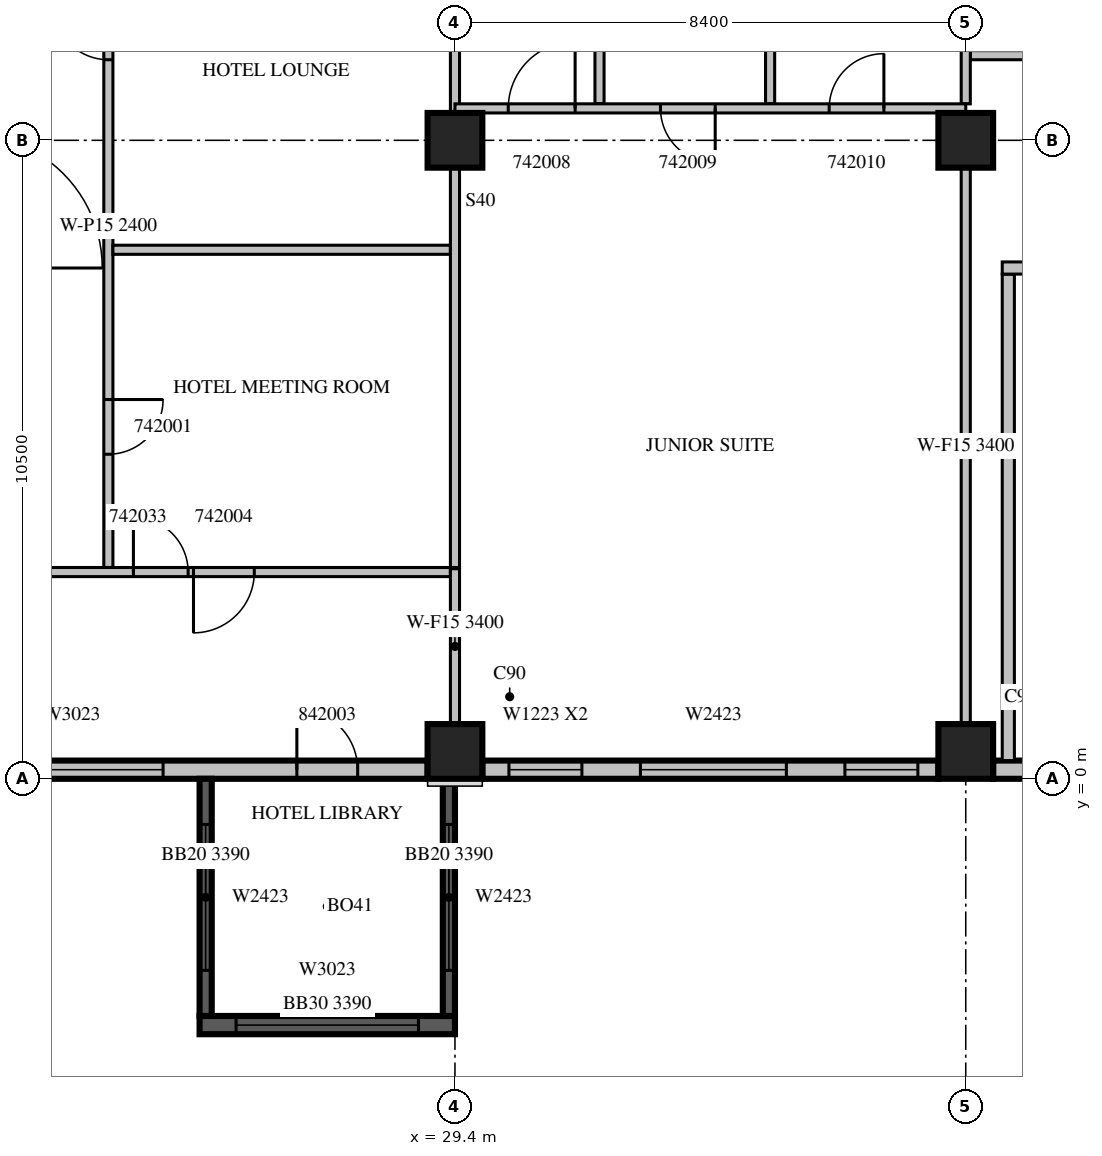
"""IFC4 building model, lengths in metres.
Left out: names, types, materials, properties, quantities, classifications, styles, units other than length and angle.
Written with IfcOpenShell. Run it as: python <this file> out.ifc"""

import sys

from ifc_helpers import new_model, si_unit, direction, frame, frame_2d, origin, origin_2d, place, context, subcontext, project, spatial, rectangle, extrude, source, transform, mapped, element, fill, save


model = new_model("IFC4")
c1 = context("Model", 3, precision=1e-05, world=origin(), true_north=direction((0.0, 1.0)))
c2 = subcontext(c1, "Body", "Model", "MODEL_VIEW")
j1 = project(units=[si_unit("LENGTHUNIT", "METRE"), si_unit("PLANEANGLEUNIT", "RADIAN")], contexts=[c1])
p1 = place(None, origin())
s1 = spatial("IfcSite", under=j1, at=p1, CompositionType="ELEMENT")
p2 = place(p1, origin())
s2 = spatial("IfcBuilding", under=s1, at=p2, CompositionType="ELEMENT")
p3 = place(p2, frame((0.0, 0.0, 193.0)))
s3 = spatial("IfcBuildingStorey", under=s2, at=p3, CompositionType="ELEMENT", Elevation=193.0)
m1 = source(origin(), c2, "Body", "SweptSolid", [
    extrude(rectangle(XDim=0.9, YDim=0.9, at=origin_2d()), origin(), (0.0, 0.0, 1.0), 3.8),
])
for number, where, z_axis, x_axis in (
    (1, (29.4, 0.45, 0.0), (0.0, 0.0, 1.0), (1.0, 0.0, 0.0)),
    (2, (37.8, 0.45, 0.0), (0.0, 0.0, 1.0), (1.0, 0.0, 0.0)),
    (3, (29.4, 10.5, 0.0), (0.0, 0.0, 1.0), (1.0, 0.0, 0.0)),
    (4, (37.8, 10.5, 0.0), (0.0, 0.0, 1.0), (1.0, 0.0, 0.0)),
):
    element("IfcColumn", number, at=place(p3, frame(where, z_axis=z_axis, x_axis=x_axis)), inside=s3, PredefinedType="COLUMN", context=c2, shape_type="MappedRepresentation", body=[
        mapped(m1, transform((0.0, 0.0, 0.0), scale=1.0)),
    ])
m2 = source(origin(), c2, "Body", "SweptSolid", [
    extrude(rectangle(XDim=7.5, YDim=0.3, at=frame_2d((3.75, 0.0))), origin(), (0.0, 0.0, 1.0), 3.4),
])
p4 = place(p3, frame((21.45, 0.15, 0.0), z_axis=(0.0, 0.0, 1.0), x_axis=(1.0, 0.0, 0.0)))
e5 = element("IfcWall", 5, at=p4, inside=s3, PredefinedType="STANDARD", context=c2, shape_type="MappedRepresentation", body=[
    mapped(m2, transform((0.0, 0.0, 0.0), scale=1.0)),
])
m3 = source(origin(), c2, "Body", "SweptSolid", [
    extrude(rectangle(XDim=3.0, YDim=2.3, at=frame_2d((1.5, 1.15))), frame((0.0, 0.16, 0.0), z_axis=(0.0, -1.0, 0.0), x_axis=(1.0, 0.0, 0.0)), (0.0, 0.0, 1.0), 0.32),
])
p5 = place(p4, frame((0.15, 0.0, 0.6)))
e6 = element("IfcOpeningElement", 6, at=p5, cuts=e5, PredefinedType="OPENING", context=c2, shape_type="MappedRepresentation", body=[
    mapped(m3, transform((0.0, 0.0, 0.0), scale=1.0)),
])
m4 = source(origin(), c2, "Body", "SweptSolid", [
    extrude(rectangle(XDim=1.0, YDim=2.1, at=frame_2d((0.5, 1.05))), frame((0.0, 0.16, 0.0), z_axis=(0.0, -1.0, 0.0), x_axis=(1.0, 0.0, 0.0)), (0.0, 0.0, 1.0), 0.32),
])
p6 = place(p4, frame((5.35, 0.0, 0.0)))
e7 = element("IfcOpeningElement", 7, at=p6, cuts=e5, PredefinedType="OPENING", context=c2, shape_type="MappedRepresentation", body=[
    mapped(m4, transform((0.0, 0.0, 0.0), scale=1.0)),
])
p7 = place(p3, frame((29.85, 0.15, 0.0), z_axis=(0.0, 0.0, 1.0), x_axis=(1.0, 0.0, 0.0)))
e8 = element("IfcWall", 8, at=p7, inside=s3, PredefinedType="STANDARD", context=c2, shape_type="MappedRepresentation", body=[
    mapped(m2, transform((0.0, 0.0, 0.0), scale=1.0)),
])
m5 = source(origin(), c2, "Body", "SweptSolid", [
    extrude(rectangle(XDim=1.2, YDim=2.3, at=frame_2d((0.6, 1.15))), frame((0.0, 0.16, 0.0), z_axis=(0.0, -1.0, 0.0), x_axis=(1.0, 0.0, 0.0)), (0.0, 0.0, 1.0), 0.32),
])
p8 = place(p7, frame((0.438, 0.0, 0.6)))
e9 = element("IfcOpeningElement", 9, at=p8, cuts=e8, PredefinedType="OPENING", context=c2, shape_type="MappedRepresentation", body=[
    mapped(m5, transform((0.0, 0.0, 0.0), scale=1.0)),
])
p9 = place(p7, frame((5.963, 0.0, 0.6)))
e10 = element("IfcOpeningElement", 10, at=p9, cuts=e8, PredefinedType="OPENING", context=c2, shape_type="MappedRepresentation", body=[
    mapped(m5, transform((0.0, 0.0, 0.0), scale=1.0)),
])
m6 = source(origin(), c2, "Body", "SweptSolid", [
    extrude(rectangle(XDim=2.4, YDim=2.3, at=frame_2d((1.2, 1.15))), frame((0.0, 0.16, 0.0), z_axis=(0.0, -1.0, 0.0), x_axis=(1.0, 0.0, 0.0)), (0.0, 0.0, 1.0), 0.32),
])
p10 = place(p7, frame((2.6, 0.0, 0.6)))
e11 = element("IfcOpeningElement", 11, at=p10, cuts=e8, PredefinedType="OPENING", context=c2, shape_type="MappedRepresentation", body=[
    mapped(m6, transform((0.0, 0.0, 0.0), scale=1.0)),
])
m7 = source(origin(), c2, "Body", "SweptSolid", [
    extrude(rectangle(XDim=1.95, YDim=0.3, at=frame_2d((0.975, 0.0))), origin(), (0.0, 0.0, 1.0), 3.4),
])
p11 = place(p3, frame((38.25, 0.15, 0.0), z_axis=(0.0, 0.0, 1.0), x_axis=(1.0, 0.0, 0.0)))
e12 = element("IfcWall", 12, at=p11, inside=s3, PredefinedType="STANDARD", context=c2, shape_type="MappedRepresentation", body=[
    mapped(m7, transform((0.0, 0.0, 0.0), scale=1.0)),
])
m8 = source(origin(), c2, "Body", "SweptSolid", [
    extrude(rectangle(XDim=4.2, YDim=0.3, at=frame_2d((2.1, 0.0))), origin(), (0.0, 0.0, 1.0), 3.39),
])
p12 = place(p3, frame((25.2, -4.05, 0.0), z_axis=(0.0, 0.0, 1.0), x_axis=(1.0, 0.0, 0.0)))
e13 = element("IfcWall", 13, at=p12, inside=s3, PredefinedType="SOLIDWALL", context=c2, shape_type="MappedRepresentation", body=[
    mapped(m8, transform((0.0, 0.0, 0.0), scale=1.0)),
])
p13 = place(p12, frame((0.6, 0.0, 0.6)))
e14 = element("IfcOpeningElement", 14, at=p13, cuts=e13, PredefinedType="OPENING", context=c2, shape_type="MappedRepresentation", body=[
    mapped(m3, transform((0.0, 0.0, 0.0), scale=1.0)),
])
m9 = source(origin(), c2, "Body", "SweptSolid", [
    extrude(rectangle(XDim=3.9, YDim=0.2, at=frame_2d((1.95, 0.0))), origin(), (0.0, 0.0, 1.0), 3.39),
])
p14 = place(p3, frame((25.3, 0.0, 0.0), z_axis=(0.0, 0.0, 1.0), x_axis=(0.0, -1.0, 0.0)))
e15 = element("IfcWall", 15, at=p14, inside=s3, PredefinedType="SOLIDWALL", context=c2, shape_type="MappedRepresentation", body=[
    mapped(m9, transform((0.0, 0.0, 0.0), scale=1.0)),
])
m10 = source(origin(), c2, "Body", "SweptSolid", [
    extrude(rectangle(XDim=2.4, YDim=2.3, at=frame_2d((1.2, 1.15))), frame((0.0, 0.11, 0.0), z_axis=(0.0, -1.0, 0.0), x_axis=(1.0, 0.0, 0.0)), (0.0, 0.0, 1.0), 0.22),
])
p15 = place(p14, frame((0.75, 0.0, 0.6)))
e16 = element("IfcOpeningElement", 16, at=p15, cuts=e15, PredefinedType="OPENING", context=c2, shape_type="MappedRepresentation", body=[
    mapped(m10, transform((0.0, 0.0, 0.0), scale=1.0)),
])
p16 = place(p3, frame((29.3, 0.0, 0.0), z_axis=(0.0, 0.0, 1.0), x_axis=(0.0, -1.0, 0.0)))
e17 = element("IfcWall", 17, at=p16, inside=s3, PredefinedType="SOLIDWALL", context=c2, shape_type="MappedRepresentation", body=[
    mapped(m9, transform((0.0, 0.0, 0.0), scale=1.0)),
])
p17 = place(p16, frame((0.75, 0.0, 0.6)))
e18 = element("IfcOpeningElement", 18, at=p17, cuts=e17, PredefinedType="OPENING", context=c2, shape_type="MappedRepresentation", body=[
    mapped(m10, transform((0.0, 0.0, 0.0), scale=1.0)),
])
m11 = source(origin(), c2, "Body", "SweptSolid", [
    extrude(rectangle(XDim=8.0, YDim=0.2, at=frame_2d((4.0, 0.0))), origin(), (0.0, 0.0, 1.0), 3.4),
])
p18 = place(p3, frame((38.5, 0.3, 0.0), z_axis=(0.0, 0.0, 1.0), x_axis=(0.0, 1.0, 0.0)))
e19 = element("IfcWall", 19, at=p18, inside=s3, PredefinedType="PARTITIONING", context=c2, shape_type="MappedRepresentation", body=[
    mapped(m11, transform((0.0, 0.0, 0.0), scale=1.0)),
])
m12 = source(origin(), c2, "Body", "SweptSolid", [
    extrude(rectangle(XDim=5.45, YDim=0.2, at=frame_2d((2.725, 0.0))), origin(), (0.0, 0.0, 1.0), 3.4),
])
p19 = place(p3, frame((38.4, 8.4, 0.0), z_axis=(0.0, 0.0, 1.0), x_axis=(1.0, 0.0, 0.0)))
e20 = element("IfcWall", 20, at=p19, inside=s3, PredefinedType="PARTITIONING", context=c2, shape_type="MappedRepresentation", body=[
    mapped(m12, transform((0.0, 0.0, 0.0), scale=1.0)),
])
m13 = source(origin(), c2, "Body", "SweptSolid", [
    extrude(rectangle(XDim=1.2, YDim=2.1, at=frame_2d((0.6, 1.05))), frame((0.0, 0.11, 0.0), z_axis=(0.0, -1.0, 0.0), x_axis=(1.0, 0.0, 0.0)), (0.0, 0.0, 1.0), 0.22),
])
p20 = place(p19, frame((0.4, 0.0, 0.0)))
e21 = element("IfcOpeningElement", 21, at=p20, cuts=e20, PredefinedType="OPENING", context=c2, shape_type="MappedRepresentation", body=[
    mapped(m13, transform((0.0, 0.0, 0.0), scale=1.0)),
])
m14 = source(origin(), c2, "Body", "SweptSolid", [
    extrude(rectangle(XDim=0.9, YDim=2.1, at=frame_2d((0.45, 1.05))), frame((0.0, 0.11, 0.0), z_axis=(0.0, -1.0, 0.0), x_axis=(1.0, 0.0, 0.0)), (0.0, 0.0, 1.0), 0.22),
])
p21 = place(p19, frame((3.25, 0.0, 0.0)))
e22 = element("IfcOpeningElement", 22, at=p21, cuts=e20, PredefinedType="OPENING", context=c2, shape_type="MappedRepresentation", body=[
    mapped(m14, transform((0.0, 0.0, 0.0), scale=1.0)),
])
p22 = place(p3, frame((23.7, 14.7, 0.0), z_axis=(0.0, 0.0, 1.0), x_axis=(0.0, -1.0, 0.0)))
e23 = element("IfcWall", 23, at=p22, inside=s3, PredefinedType="PARTITIONING", context=c2, shape_type="SweptSolid", body=[
    extrude(rectangle(XDim=11.225, YDim=0.15, at=frame_2d((5.612, 0.0))), origin(), (0.0, 0.0, 1.0), 2.4),
])
m15 = source(origin(), c2, "Body", "SweptSolid", [
    extrude(rectangle(XDim=0.9, YDim=2.1, at=frame_2d((0.45, 1.05))), frame((0.0, 0.085, 0.0), z_axis=(0.0, -1.0, 0.0), x_axis=(1.0, 0.0, 0.0)), (0.0, 0.0, 1.0), 0.17),
])
p23 = place(p22, frame((8.463, 0.0, 0.0)))
e24 = element("IfcOpeningElement", 24, at=p23, cuts=e23, PredefinedType="OPENING", context=c2, shape_type="MappedRepresentation", body=[
    mapped(m15, transform((0.0, 0.0, 0.0), scale=1.0)),
])
p24 = place(p22, frame((1.975, 0.0, 0.0)))
e25 = element("IfcOpeningElement", 25, at=p24, cuts=e23, PredefinedType="OPENING", context=c2, shape_type="MappedRepresentation", body=[
    mapped(m15, transform((0.0, 0.0, 0.0), scale=1.0)),
])
m16 = source(origin(), c2, "Body", "SweptSolid", [
    extrude(rectangle(XDim=5.55, YDim=0.15, at=frame_2d((2.775, 0.0))), origin(), (0.0, 0.0, 1.0), 3.4),
])
p25 = place(p3, frame((29.325, 8.7, 0.0), z_axis=(0.0, 0.0, 1.0), x_axis=(-1.0, 0.0, 0.0)))
e26 = element("IfcWall", 26, at=p25, inside=s3, PredefinedType="PARTITIONING", context=c2, shape_type="MappedRepresentation", body=[
    mapped(m16, transform((0.0, 0.0, 0.0), scale=1.0)),
])
m17 = source(origin(), c2, "Body", "SweptSolid", [
    extrude(rectangle(XDim=6.576, YDim=0.15, at=frame_2d((3.288, 0.0))), origin(), (0.0, 0.0, 1.0), 3.4),
])
p26 = place(p3, frame((29.4, 3.475, 0.0), z_axis=(0.0, 0.0, 1.0), x_axis=(0.0, 1.0, 0.0)))
e27 = element("IfcWall", 27, at=p26, inside=s3, PredefinedType="PARTITIONING", context=c2, shape_type="MappedRepresentation", body=[
    mapped(m17, transform((0.0, 0.0, 0.0), scale=1.0)),
])
p27 = place(p3, frame((29.4, 10.949, 0.0), z_axis=(0.0, 0.0, 1.0), x_axis=(0.0, 1.0, 0.0)))
e28 = element("IfcWall", 28, at=p27, inside=s3, PredefinedType="PARTITIONING", context=c2, shape_type="SweptSolid", body=[
    extrude(rectangle(XDim=3.751, YDim=0.15, at=frame_2d((1.875, 0.0))), origin(), (0.0, 0.0, 1.0), 3.4),
])
m18 = source(origin(), c2, "Body", "SweptSolid", [
    extrude(rectangle(XDim=7.525, YDim=0.15, at=frame_2d((3.763, 0.0))), origin(), (0.0, 0.0, 1.0), 3.4),
])
p28 = place(p3, frame((21.8, 3.4, 0.0), z_axis=(0.0, 0.0, 1.0), x_axis=(1.0, 0.0, 0.0)))
e29 = element("IfcWall", 29, at=p28, inside=s3, PredefinedType="PARTITIONING", context=c2, shape_type="MappedRepresentation", body=[
    mapped(m18, transform((0.0, 0.0, 0.0), scale=1.0)),
])
m19 = source(origin(), c2, "Body", "SweptSolid", [
    extrude(rectangle(XDim=1.0, YDim=2.1, at=frame_2d((0.5, 1.05))), frame((0.0, 0.085, 0.0), z_axis=(0.0, -1.0, 0.0), x_axis=(1.0, 0.0, 0.0)), (0.0, 0.0, 1.0), 0.17),
])
p29 = place(p28, frame((3.3, 0.0, 0.0)))
e30 = element("IfcOpeningElement", 30, at=p29, cuts=e29, PredefinedType="OPENING", context=c2, shape_type="MappedRepresentation", body=[
    mapped(m19, transform((0.0, 0.0, 0.0), scale=1.0)),
])
p30 = place(p28, frame((2.312, 0.0, 0.0)))
e31 = element("IfcOpeningElement", 31, at=p30, cuts=e29, PredefinedType="OPENING", context=c2, shape_type="MappedRepresentation", body=[
    mapped(m15, transform((0.0, 0.0, 0.0), scale=1.0)),
])
m20 = source(origin(), c2, "Body", "SweptSolid", [
    extrude(rectangle(XDim=6.45, YDim=0.15, at=frame_2d((3.225, 0.0))), origin(), (0.0, 0.0, 1.0), 3.4),
])
p31 = place(p3, frame((37.875, 11.9, 0.0), z_axis=(0.0, 0.0, 1.0), x_axis=(1.0, 0.0, 0.0)))
e32 = element("IfcWall", 32, at=p31, inside=s3, PredefinedType="PARTITIONING", context=c2, shape_type="MappedRepresentation", body=[
    mapped(m20, transform((0.0, 0.0, 0.0), scale=1.0)),
])
m21 = source(origin(), c2, "Body", "SweptSolid", [
    extrude(rectangle(XDim=3.6, YDim=0.15, at=frame_2d((1.8, 0.0))), origin(), (0.0, 0.0, 1.0), 3.4),
])
for number, where, z_axis, x_axis in (
    (33, (31.777, 11.1, 0.0), (0.0, 0.0, 1.0), (0.0, 1.0, 0.0)),
    (34, (34.583, 11.1, 0.0), (0.0, 0.0, 1.0), (0.0, 1.0, 0.0)),
):
    element("IfcWall", number, at=place(p3, frame(where, z_axis=z_axis, x_axis=x_axis)), inside=s3, PredefinedType="PARTITIONING", context=c2, shape_type="MappedRepresentation", body=[
        mapped(m21, transform((0.0, 0.0, 0.0), scale=1.0)),
    ])
m22 = source(origin(), c2, "Body", "SweptSolid", [
    extrude(rectangle(XDim=2.556, YDim=0.15, at=frame_2d((1.278, 0.0))), origin(), (0.0, 0.0, 1.0), 3.4),
])
p32 = place(p3, frame((29.4, 0.899, 0.0), z_axis=(0.0, 0.0, 1.0), x_axis=(0.0, 1.0, 0.0)))
e35 = element("IfcWall", 35, at=p32, inside=s3, PredefinedType="PARTITIONING", context=c2, shape_type="MappedRepresentation", body=[
    mapped(m22, transform((0.0, 0.0, 0.0), scale=1.0)),
])
m23 = source(origin(), c2, "Body", "SweptSolid", [
    extrude(rectangle(XDim=9.152, YDim=0.15, at=frame_2d((4.576, 0.0))), origin(), (0.0, 0.0, 1.0), 3.4),
])
p33 = place(p3, frame((37.8, 0.899, 0.0), z_axis=(0.0, 0.0, 1.0), x_axis=(0.0, 1.0, 0.0)))
e36 = element("IfcWall", 36, at=p33, inside=s3, PredefinedType="PARTITIONING", context=c2, shape_type="MappedRepresentation", body=[
    mapped(m23, transform((0.0, 0.0, 0.0), scale=1.0)),
])
p34 = place(p3, frame((37.8, 11.1, 0.0), z_axis=(0.0, 0.0, 1.0), x_axis=(0.0, 1.0, 0.0)))
e37 = element("IfcWall", 37, at=p34, inside=s3, PredefinedType="PARTITIONING", context=c2, shape_type="MappedRepresentation", body=[
    mapped(m21, transform((0.0, 0.0, 0.0), scale=1.0)),
])
m24 = source(origin(), c2, "Body", "SweptSolid", [
    extrude(rectangle(XDim=8.4, YDim=0.15, at=frame_2d((4.2, 0.0))), origin(), (0.0, 0.0, 1.0), 3.4),
])
p35 = place(p3, frame((37.8, 11.025, 0.0), z_axis=(0.0, 0.0, 1.0), x_axis=(-1.0, 0.0, 0.0)))
e38 = element("IfcWall", 38, at=p35, inside=s3, PredefinedType="PARTITIONING", context=c2, shape_type="MappedRepresentation", body=[
    mapped(m24, transform((0.0, 0.0, 0.0), scale=1.0)),
])
m25 = source(origin(), c2, "Body", "SweptSolid", [
    extrude(rectangle(XDim=1.1, YDim=2.1, at=frame_2d((0.55, 1.05))), frame((0.0, 0.085, 0.0), z_axis=(0.0, -1.0, 0.0), x_axis=(1.0, 0.0, 0.0)), (0.0, 0.0, 1.0), 0.17),
])
p36 = place(p35, frame((6.424, 0.0, 0.0)))
e39 = element("IfcOpeningElement", 39, at=p36, cuts=e38, PredefinedType="OPENING", context=c2, shape_type="MappedRepresentation", body=[
    mapped(m25, transform((0.0, 0.0, 0.0), scale=1.0)),
])
p37 = place(p35, frame((4.12, 0.0, 0.0)))
e40 = element("IfcOpeningElement", 40, at=p37, cuts=e38, PredefinedType="OPENING", context=c2, shape_type="MappedRepresentation", body=[
    mapped(m15, transform((0.0, 0.0, 0.0), scale=1.0)),
])
p38 = place(p35, frame((1.346, 0.0, 0.0)))
e41 = element("IfcOpeningElement", 41, at=p38, cuts=e38, PredefinedType="OPENING", context=c2, shape_type="MappedRepresentation", body=[
    mapped(m15, transform((0.0, 0.0, 0.0), scale=1.0)),
])
m26 = source(origin(), c2, "Body", "SweptSolid", [
    extrude(rectangle(XDim=3.0, YDim=2.3, at=frame_2d((1.5, 1.15))), frame((0.0, 0.03, 0.0), z_axis=(0.0, -1.0, 0.0), x_axis=(1.0, 0.0, 0.0)), (0.0, 0.0, 1.0), 0.06),
])
p39 = place(p5, origin())
e42 = element("IfcWindow", 42, at=p39, inside=s3, PartitioningType="SINGLE_PANEL", PredefinedType="WINDOW", context=c2, shape_type="MappedRepresentation", body=[
    mapped(m26, transform((0.0, 0.0, 0.0), scale=1.0)),
])
fill(e6, e42)
m27 = source(origin(), c2, "Body", "SweptSolid", [
    extrude(rectangle(XDim=1.2, YDim=2.3, at=frame_2d((0.6, 1.15))), frame((0.0, 0.03, 0.0), z_axis=(0.0, -1.0, 0.0), x_axis=(1.0, 0.0, 0.0)), (0.0, 0.0, 1.0), 0.06),
])
p40 = place(p8, origin())
e43 = element("IfcWindow", 43, at=p40, inside=s3, PartitioningType="SINGLE_PANEL", PredefinedType="WINDOW", context=c2, shape_type="MappedRepresentation", body=[
    mapped(m27, transform((0.0, 0.0, 0.0), scale=1.0)),
])
fill(e9, e43)
p41 = place(p9, origin())
e44 = element("IfcWindow", 44, at=p41, inside=s3, PartitioningType="SINGLE_PANEL", PredefinedType="WINDOW", context=c2, shape_type="MappedRepresentation", body=[
    mapped(m27, transform((0.0, 0.0, 0.0), scale=1.0)),
])
fill(e10, e44)
m28 = source(origin(), c2, "Body", "SweptSolid", [
    extrude(rectangle(XDim=2.4, YDim=2.3, at=frame_2d((1.2, 1.15))), frame((0.0, 0.03, 0.0), z_axis=(0.0, -1.0, 0.0), x_axis=(1.0, 0.0, 0.0)), (0.0, 0.0, 1.0), 0.06),
])
p42 = place(p10, origin())
e45 = element("IfcWindow", 45, at=p42, inside=s3, PartitioningType="SINGLE_PANEL", PredefinedType="WINDOW", context=c2, shape_type="MappedRepresentation", body=[
    mapped(m28, transform((0.0, 0.0, 0.0), scale=1.0)),
])
fill(e11, e45)
p43 = place(p13, origin())
e46 = element("IfcWindow", 46, at=p43, inside=s3, PartitioningType="SINGLE_PANEL", PredefinedType="WINDOW", context=c2, shape_type="MappedRepresentation", body=[
    mapped(m26, transform((0.0, 0.0, 0.0), scale=1.0)),
])
fill(e14, e46)
p44 = place(p15, origin())
e47 = element("IfcWindow", 47, at=p44, inside=s3, PartitioningType="SINGLE_PANEL", PredefinedType="WINDOW", context=c2, shape_type="MappedRepresentation", body=[
    mapped(m28, transform((0.0, 0.0, 0.0), scale=1.0)),
])
fill(e16, e47)
p45 = place(p17, origin())
e48 = element("IfcWindow", 48, at=p45, inside=s3, PartitioningType="SINGLE_PANEL", PredefinedType="WINDOW", context=c2, shape_type="MappedRepresentation", body=[
    mapped(m28, transform((0.0, 0.0, 0.0), scale=1.0)),
])
fill(e18, e48)
m29 = source(origin(), c2, "Body", "SweptSolid", [
    extrude(rectangle(XDim=0.9, YDim=2.1, at=frame_2d((0.45, 1.05))), frame((0.0, 0.025, 0.0), z_axis=(0.0, -1.0, 0.0), x_axis=(1.0, 0.0, 0.0)), (0.0, 0.0, 1.0), 0.05),
])
p46 = place(p23, origin())
e49 = element("IfcDoor", 49, at=p46, inside=s3, OperationType="SINGLE_SWING_LEFT", PredefinedType="DOOR", context=c2, shape_type="MappedRepresentation", body=[
    mapped(m29, transform((0.0, 0.0, 0.0), scale=1.0)),
])
fill(e24, e49)
p47 = place(p24, origin())
e50 = element("IfcDoor", 50, at=p47, inside=s3, OperationType="SINGLE_SWING_RIGHT", PredefinedType="DOOR", context=c2, shape_type="MappedRepresentation", body=[
    mapped(m29, transform((0.0, 0.0, 0.0), scale=1.0)),
])
fill(e25, e50)
m30 = source(origin(), c2, "Body", "SweptSolid", [
    extrude(rectangle(XDim=1.0, YDim=2.1, at=frame_2d((0.5, 1.05))), frame((0.0, 0.025, 0.0), z_axis=(0.0, -1.0, 0.0), x_axis=(1.0, 0.0, 0.0)), (0.0, 0.0, 1.0), 0.05),
])
p48 = place(p29, origin())
e51 = element("IfcDoor", 51, at=p48, inside=s3, OperationType="SINGLE_SWING_RIGHT", PredefinedType="DOOR", context=c2, shape_type="MappedRepresentation", body=[
    mapped(m30, transform((0.0, 0.0, 0.0), scale=1.0)),
])
fill(e30, e51)
m31 = source(origin(), c2, "Body", "SweptSolid", [
    extrude(rectangle(XDim=1.1, YDim=2.1, at=frame_2d((0.55, 1.05))), frame((0.0, 0.025, 0.0), z_axis=(0.0, -1.0, 0.0), x_axis=(1.0, 0.0, 0.0)), (0.0, 0.0, 1.0), 0.05),
])
p49 = place(p36, origin())
e52 = element("IfcDoor", 52, at=p49, inside=s3, OperationType="SINGLE_SWING_RIGHT", PredefinedType="DOOR", context=c2, shape_type="MappedRepresentation", body=[
    mapped(m31, transform((0.0, 0.0, 0.0), scale=1.0)),
])
fill(e39, e52)
p50 = place(p37, origin())
e53 = element("IfcDoor", 53, at=p50, inside=s3, OperationType="SINGLE_SWING_LEFT", PredefinedType="DOOR", context=c2, shape_type="MappedRepresentation", body=[
    mapped(m29, transform((0.0, 0.0, 0.0), scale=1.0)),
])
fill(e40, e53)
p51 = place(p38, origin())
e54 = element("IfcDoor", 54, at=p51, inside=s3, OperationType="SINGLE_SWING_RIGHT", PredefinedType="DOOR", context=c2, shape_type="MappedRepresentation", body=[
    mapped(m29, transform((0.0, 0.0, 0.0), scale=1.0)),
])
fill(e41, e54)
p52 = place(p30, origin())
e55 = element("IfcDoor", 55, at=p52, inside=s3, OperationType="SINGLE_SWING_LEFT", PredefinedType="DOOR", context=c2, shape_type="MappedRepresentation", body=[
    mapped(m29, transform((0.0, 0.0, 0.0), scale=1.0)),
])
fill(e31, e55)
p53 = place(p6, origin())
e56 = element("IfcDoor", 56, at=p53, inside=s3, OperationType="SINGLE_SWING_LEFT", PredefinedType="DOOR", context=c2, shape_type="MappedRepresentation", body=[
    mapped(m30, transform((0.0, 0.0, 0.0), scale=1.0)),
])
fill(e7, e56)
save(model, sys.argv[1])
